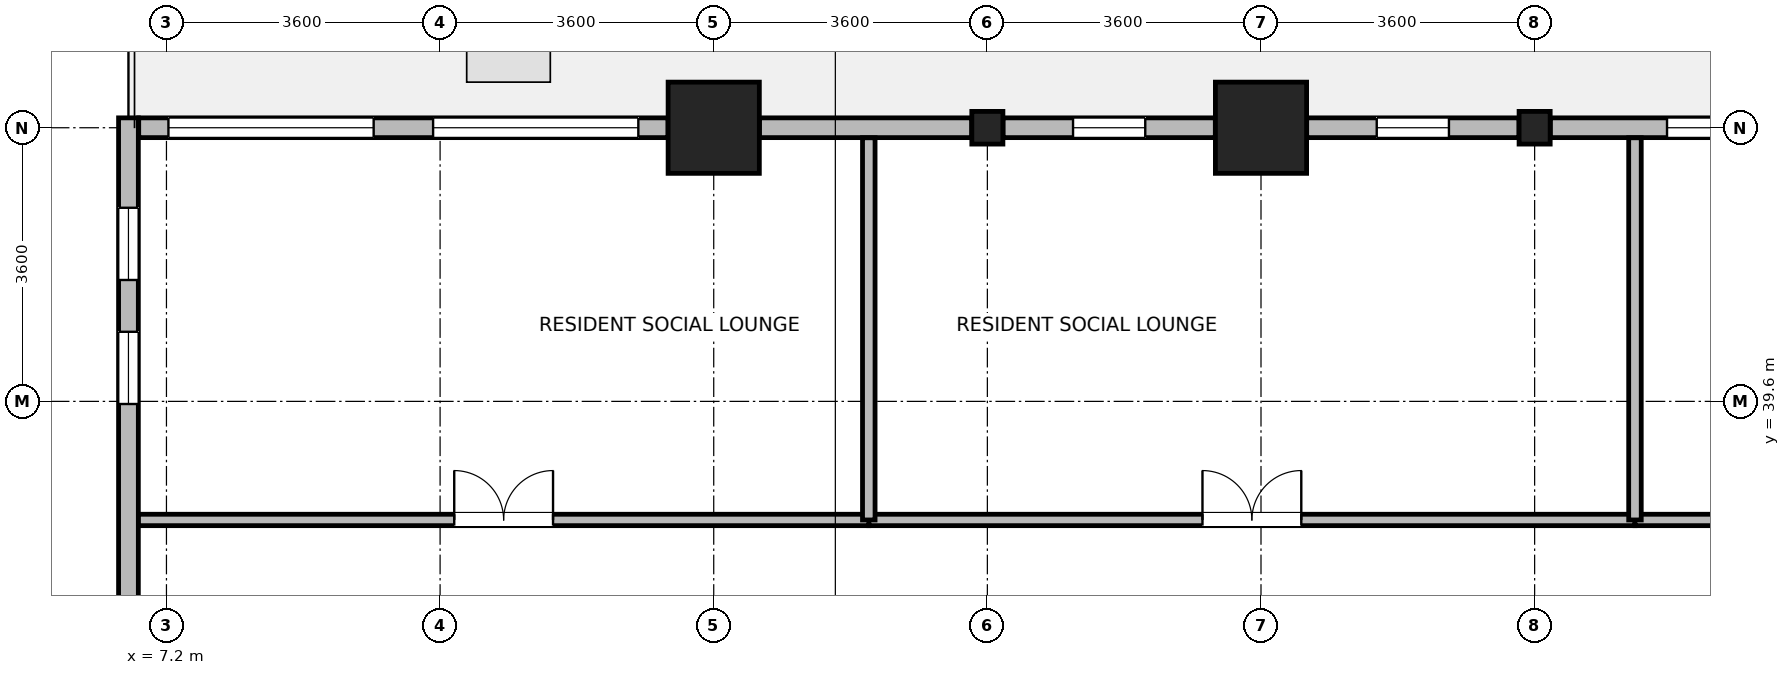
"""IFC4 building model, lengths in metres.
Left out: names, types, materials, properties, quantities, classifications, styles, units other than length and angle.
Written with IfcOpenShell. Run it as: python <this file> out.ifc"""

import sys

from ifc_helpers import new_model, si_unit, direction, frame, frame_2d, origin, origin_2d, place, context, subcontext, project, spatial, rectangle, i_section, extrude, source, transform, mapped, element, fill, save


model = new_model("IFC4")
c1 = context("Model", 3, precision=1e-05, world=origin(), true_north=direction((0.0, 1.0)))
c2 = subcontext(c1, "Body", "Model", "MODEL_VIEW")
j1 = project(units=[si_unit("LENGTHUNIT", "METRE"), si_unit("PLANEANGLEUNIT", "RADIAN")], contexts=[c1])
p1 = place(None, origin())
s1 = spatial("IfcSite", under=j1, at=p1, CompositionType="ELEMENT")
p2 = place(p1, origin())
s2 = spatial("IfcBuilding", under=s1, at=p2, CompositionType="ELEMENT")
p3 = place(p2, frame((0.0, 0.0, 82.3)))
s3 = spatial("IfcBuildingStorey", under=s2, at=p3, CompositionType="ELEMENT", Elevation=82.3)
m1 = source(origin(), c2, "Body", "SweptSolid", [
    extrude(rectangle(XDim=1.2, YDim=1.2, at=origin_2d()), origin(), (0.0, 0.0, 1.0), 3.7),
])
for number, where, z_axis, x_axis in (
    (1, (14.4, 43.2, 0.0), (0.0, 0.0, 1.0), (1.0, 0.0, 0.0)),
    (2, (21.6, 43.2, 0.0), (0.0, 0.0, 1.0), (1.0, 0.0, 0.0)),
):
    element("IfcColumn", number, at=place(p3, frame(where, z_axis=z_axis, x_axis=x_axis)), inside=s3, PredefinedType="COLUMN", context=c2, shape_type="MappedRepresentation", body=[
        mapped(m1, transform((0.0, 0.0, 0.0), x_axis=(1.0, 0.0, 0.0), y_axis=(0.0, 1.0, 0.0), z_axis=(0.0, 0.0, 1.0), scale=1.0)),
    ])
m2 = source(origin(), c2, "Body", "SweptSolid", [
    extrude(i_section(OverallWidth=0.409, OverallDepth=0.43, WebThickness=0.024, FlangeThickness=0.033, FilletRadius=0.015, at=origin_2d()), origin(), (0.0, 0.0, 1.0), 3.7),
])
for number, where, z_axis, x_axis in (
    (3, (18.0, 43.2, 0.0), (0.0, 0.0, 1.0), (1.0, 0.0, 0.0)),
    (4, (25.2, 43.2, 0.0), (0.0, 0.0, 1.0), (1.0, 0.0, 0.0)),
):
    element("IfcColumn", number, at=place(p3, frame(where, z_axis=z_axis, x_axis=x_axis)), inside=s3, PredefinedType="COLUMN", context=c2, shape_type="MappedRepresentation", body=[
        mapped(m2, transform((0.0, 0.0, 0.0), x_axis=(1.0, 0.0, 0.0), y_axis=(0.0, 1.0, 0.0), z_axis=(0.0, 0.0, 1.0), scale=1.0)),
    ])
p4 = place(p3, frame((25.406, 43.2, 0.0), z_axis=(0.0, 0.0, 1.0), x_axis=(1.0, 0.0, 0.0)))
e5 = element("IfcWall", 5, at=p4, inside=s3, PredefinedType="STANDARD", context=c2, shape_type="SweptSolid", body=[
    extrude(rectangle(XDim=2.793, YDim=0.26, at=frame_2d((1.397, 0.0))), origin(), (0.0, 0.0, 1.0), 2.93),
])
p5 = place(p4, frame((1.536, 0.0, 0.85)))
e6 = element("IfcOpeningElement", 6, at=p5, cuts=e5, PredefinedType="OPENING", context=c2, shape_type="SweptSolid", body=[
    extrude(rectangle(XDim=0.95, YDim=1.75, at=frame_2d((0.475, 0.875))), frame((0.0, 0.14, 0.0), z_axis=(0.0, -1.0, 0.0), x_axis=(1.0, 0.0, 0.0)), (0.0, 0.0, 1.0), 0.28),
])
p6 = place(p3, frame((22.201, 43.2, 0.0), z_axis=(0.0, 0.0, 1.0), x_axis=(1.0, 0.0, 0.0)))
e7 = element("IfcWall", 7, at=p6, inside=s3, PredefinedType="STANDARD", context=c2, shape_type="SweptSolid", body=[
    extrude(rectangle(XDim=2.793, YDim=0.26, at=frame_2d((1.397, 0.0))), origin(), (0.0, 0.0, 1.0), 2.93),
])
p7 = place(p6, frame((0.922, 0.0, 0.85)))
e8 = element("IfcOpeningElement", 8, at=p7, cuts=e7, PredefinedType="OPENING", context=c2, shape_type="SweptSolid", body=[
    extrude(rectangle(XDim=0.95, YDim=1.75, at=frame_2d((0.475, 0.875))), frame((0.0, 0.14, 0.0), z_axis=(0.0, -1.0, 0.0), x_axis=(1.0, 0.0, 0.0)), (0.0, 0.0, 1.0), 0.28),
])
p8 = place(p3, frame((18.206, 43.2, 0.0), z_axis=(0.0, 0.0, 1.0), x_axis=(1.0, 0.0, 0.0)))
e9 = element("IfcWall", 9, at=p8, inside=s3, PredefinedType="STANDARD", context=c2, shape_type="SweptSolid", body=[
    extrude(rectangle(XDim=2.793, YDim=0.26, at=frame_2d((1.397, 0.0))), origin(), (0.0, 0.0, 1.0), 2.93),
])
p9 = place(p8, frame((0.922, 0.0, 0.85)))
e10 = element("IfcOpeningElement", 10, at=p9, cuts=e9, PredefinedType="OPENING", context=c2, shape_type="SweptSolid", body=[
    extrude(rectangle(XDim=0.95, YDim=1.75, at=frame_2d((0.475, 0.875))), frame((0.0, 0.14, 0.0), z_axis=(0.0, -1.0, 0.0), x_axis=(1.0, 0.0, 0.0)), (0.0, 0.0, 1.0), 0.28),
])
p10 = place(p3, frame((15.001, 43.2, 0.0), z_axis=(0.0, 0.0, 1.0), x_axis=(1.0, 0.0, 0.0)))
e11 = element("IfcWall", 11, at=p10, inside=s3, PredefinedType="STANDARD", context=c2, shape_type="SweptSolid", body=[
    extrude(rectangle(XDim=2.793, YDim=0.26, at=frame_2d((1.397, 0.0))), origin(), (0.0, 0.0, 1.0), 2.93),
])
p11 = place(p3, frame((6.835, 43.2, 0.0), z_axis=(0.0, 0.0, 1.0), x_axis=(1.0, 0.0, 0.0)))
e12 = element("IfcWall", 12, at=p11, inside=s3, PredefinedType="STANDARD", context=c2, shape_type="SweptSolid", body=[
    extrude(rectangle(XDim=6.964, YDim=0.26, at=frame_2d((3.482, 0.0))), origin(), (0.0, 0.0, 1.0), 3.43),
])
p12 = place(p11, frame((0.391, 0.0, 0.85)))
e13 = element("IfcOpeningElement", 13, at=p12, cuts=e12, PredefinedType="OPENING", context=c2, shape_type="SweptSolid", body=[
    extrude(rectangle(XDim=2.7, YDim=2.05, at=frame_2d((1.35, 1.025))), frame((0.0, 0.14, 0.0), z_axis=(0.0, -1.0, 0.0), x_axis=(1.0, 0.0, 0.0)), (0.0, 0.0, 1.0), 0.28),
])
p13 = place(p11, frame((3.873, 0.0, 0.85)))
e14 = element("IfcOpeningElement", 14, at=p13, cuts=e12, PredefinedType="OPENING", context=c2, shape_type="SweptSolid", body=[
    extrude(rectangle(XDim=2.7, YDim=2.05, at=frame_2d((1.35, 1.025))), frame((0.0, 0.14, 0.0), z_axis=(0.0, -1.0, 0.0), x_axis=(1.0, 0.0, 0.0)), (0.0, 0.0, 1.0), 0.28),
])
p14 = place(p3, frame((6.7, 36.751, 0.0), z_axis=(0.0, 0.0, 1.0), x_axis=(0.0, 1.0, 0.0)))
e15 = element("IfcWall", 15, at=p14, inside=s3, PredefinedType="STANDARD", context=c2, shape_type="SweptSolid", body=[
    extrude(rectangle(XDim=6.579, YDim=0.26, at=frame_2d((3.29, 0.0))), origin(), (0.0, 0.0, 1.0), 3.43),
])
p15 = place(p14, frame((2.814, 0.0, 0.85)))
e16 = element("IfcOpeningElement", 16, at=p15, cuts=e15, PredefinedType="OPENING", context=c2, shape_type="SweptSolid", body=[
    extrude(rectangle(XDim=0.95, YDim=1.75, at=frame_2d((0.475, 0.875))), frame((0.0, 0.14, 0.0), z_axis=(0.0, -1.0, 0.0), x_axis=(1.0, 0.0, 0.0)), (0.0, 0.0, 1.0), 0.28),
])
p16 = place(p14, frame((4.446, 0.0, 0.85)))
e17 = element("IfcOpeningElement", 17, at=p16, cuts=e15, PredefinedType="OPENING", context=c2, shape_type="SweptSolid", body=[
    extrude(rectangle(XDim=0.95, YDim=1.75, at=frame_2d((0.475, 0.875))), frame((0.0, 0.14, 0.0), z_axis=(0.0, -1.0, 0.0), x_axis=(1.0, 0.0, 0.0)), (0.0, 0.0, 1.0), 0.28),
])
p17 = place(p3, frame((16.44, 38.04, 0.0), z_axis=(0.0, 0.0, 1.0), x_axis=(1.0, 0.0, 0.0)))
e18 = element("IfcWall", 18, at=p17, inside=s3, PredefinedType="PARTITIONING", context=c2, shape_type="SweptSolid", body=[
    extrude(rectangle(XDim=10.08, YDim=0.15, at=frame_2d((5.04, 0.0))), origin(), (0.0, 0.0, 1.0), 3.43),
])
p18 = place(p17, frame((4.39, 0.0, 0.0)))
e19 = element("IfcOpeningElement", 19, at=p18, cuts=e18, PredefinedType="OPENING", context=c2, shape_type="SweptSolid", body=[
    extrude(rectangle(XDim=1.3, YDim=2.12, at=frame_2d((0.65, 1.06))), frame((0.0, 0.085, 0.0), z_axis=(0.0, -1.0, 0.0), x_axis=(1.0, 0.0, 0.0)), (0.0, 0.0, 1.0), 0.17),
])
p19 = place(p3, frame((6.832, 38.04, 0.0), z_axis=(0.0, 0.0, 1.0), x_axis=(1.0, 0.0, 0.0)))
e20 = element("IfcWall", 20, at=p19, inside=s3, PredefinedType="PARTITIONING", context=c2, shape_type="SweptSolid", body=[
    extrude(rectangle(XDim=9.608, YDim=0.15, at=frame_2d((4.804, 0.0))), origin(), (0.0, 0.0, 1.0), 3.43),
])
p20 = place(p19, frame((4.154, 0.0, 0.0)))
e21 = element("IfcOpeningElement", 21, at=p20, cuts=e20, PredefinedType="OPENING", context=c2, shape_type="SweptSolid", body=[
    extrude(rectangle(XDim=1.3, YDim=2.12, at=frame_2d((0.65, 1.06))), frame((0.0, 0.085, 0.0), z_axis=(0.0, -1.0, 0.0), x_axis=(1.0, 0.0, 0.0)), (0.0, 0.0, 1.0), 0.17),
])
p21 = place(p3, frame((26.52, 38.04, 0.0), z_axis=(0.0, 0.0, 1.0), x_axis=(1.0, 0.0, 0.0)))
e22 = element("IfcWall", 22, at=p21, inside=s3, PredefinedType="PARTITIONING", context=c2, shape_type="SweptSolid", body=[
    extrude(rectangle(XDim=9.2, YDim=0.15, at=frame_2d((4.6, 0.0))), origin(), (0.0, 0.0, 1.0), 3.43),
])
p22 = place(p21, frame((4.15, 0.0, 0.0)))
e23 = element("IfcOpeningElement", 23, at=p22, cuts=e22, PredefinedType="OPENING", context=c2, shape_type="SweptSolid", body=[
    extrude(rectangle(XDim=0.9, YDim=2.08, at=frame_2d((0.45, 1.04))), frame((0.0, 0.085, 0.0), z_axis=(0.0, -1.0, 0.0), x_axis=(1.0, 0.0, 0.0)), (0.0, 0.0, 1.0), 0.17),
])
for number, where, z_axis, x_axis in (
    (24, (16.44, 38.04, 0.0), (0.0, 0.0, 1.0), (0.0, 1.0, 0.0)),
    (25, (26.52, 38.04, 0.0), (0.0, 0.0, 1.0), (0.0, 1.0, 0.0)),
):
    element("IfcWall", number, at=place(p3, frame(where, z_axis=z_axis, x_axis=x_axis)), inside=s3, PredefinedType="PARTITIONING", context=c2, shape_type="SweptSolid", body=[
        extrude(rectangle(XDim=5.028, YDim=0.165, at=frame_2d((2.514, 0.0))), origin(), (0.0, 0.0, 1.0), 3.43),
    ])
p23 = place(p5, origin())
e26 = element("IfcWindow", 26, at=p23, inside=s3, PartitioningType="SINGLE_PANEL", PredefinedType="WINDOW", context=c2, shape_type="SweptSolid", body=[
    extrude(rectangle(XDim=0.95, YDim=1.75, at=frame_2d((0.475, 0.875))), frame((0.0, 0.03, 0.0), z_axis=(0.0, -1.0, 0.0), x_axis=(1.0, 0.0, 0.0)), (0.0, 0.0, 1.0), 0.06),
])
fill(e6, e26)
p24 = place(p7, origin())
e27 = element("IfcWindow", 27, at=p24, inside=s3, PartitioningType="SINGLE_PANEL", PredefinedType="WINDOW", context=c2, shape_type="SweptSolid", body=[
    extrude(rectangle(XDim=0.95, YDim=1.75, at=frame_2d((0.475, 0.875))), frame((0.0, 0.03, 0.0), z_axis=(0.0, -1.0, 0.0), x_axis=(1.0, 0.0, 0.0)), (0.0, 0.0, 1.0), 0.06),
])
fill(e8, e27)
p25 = place(p9, origin())
e28 = element("IfcWindow", 28, at=p25, inside=s3, PartitioningType="SINGLE_PANEL", PredefinedType="WINDOW", context=c2, shape_type="SweptSolid", body=[
    extrude(rectangle(XDim=0.95, YDim=1.75, at=frame_2d((0.475, 0.875))), frame((0.0, 0.03, 0.0), z_axis=(0.0, -1.0, 0.0), x_axis=(1.0, 0.0, 0.0)), (0.0, 0.0, 1.0), 0.06),
])
fill(e10, e28)
p26 = place(p12, origin())
e29 = element("IfcWindow", 29, at=p26, inside=s3, PartitioningType="SINGLE_PANEL", PredefinedType="WINDOW", context=c2, shape_type="SweptSolid", body=[
    extrude(rectangle(XDim=2.7, YDim=2.05, at=frame_2d((1.35, 1.025))), frame((0.0, 0.03, 0.0), z_axis=(0.0, -1.0, 0.0), x_axis=(1.0, 0.0, 0.0)), (0.0, 0.0, 1.0), 0.06),
])
fill(e13, e29)
p27 = place(p13, origin())
e30 = element("IfcWindow", 30, at=p27, inside=s3, PartitioningType="SINGLE_PANEL", PredefinedType="WINDOW", context=c2, shape_type="SweptSolid", body=[
    extrude(rectangle(XDim=2.7, YDim=2.05, at=frame_2d((1.35, 1.025))), frame((0.0, 0.03, 0.0), z_axis=(0.0, -1.0, 0.0), x_axis=(1.0, 0.0, 0.0)), (0.0, 0.0, 1.0), 0.06),
])
fill(e14, e30)
p28 = place(p15, origin())
e31 = element("IfcWindow", 31, at=p28, inside=s3, PartitioningType="SINGLE_PANEL", PredefinedType="WINDOW", context=c2, shape_type="SweptSolid", body=[
    extrude(rectangle(XDim=0.95, YDim=1.75, at=frame_2d((0.475, 0.875))), frame((0.0, 0.03, 0.0), z_axis=(0.0, -1.0, 0.0), x_axis=(1.0, 0.0, 0.0)), (0.0, 0.0, 1.0), 0.06),
])
fill(e16, e31)
p29 = place(p16, origin())
e32 = element("IfcWindow", 32, at=p29, inside=s3, PartitioningType="SINGLE_PANEL", PredefinedType="WINDOW", context=c2, shape_type="SweptSolid", body=[
    extrude(rectangle(XDim=0.95, YDim=1.75, at=frame_2d((0.475, 0.875))), frame((0.0, 0.03, 0.0), z_axis=(0.0, -1.0, 0.0), x_axis=(1.0, 0.0, 0.0)), (0.0, 0.0, 1.0), 0.06),
])
fill(e17, e32)
p30 = place(p18, origin())
e33 = element("IfcDoor", 33, at=p30, inside=s3, OperationType="DOUBLE_DOOR_SINGLE_SWING", PredefinedType="DOOR", context=c2, shape_type="SweptSolid", body=[
    extrude(rectangle(XDim=1.3, YDim=2.12, at=frame_2d((0.65, 1.06))), frame((0.0, 0.025, 0.0), z_axis=(0.0, -1.0, 0.0), x_axis=(1.0, 0.0, 0.0)), (0.0, 0.0, 1.0), 0.05),
])
fill(e19, e33)
p31 = place(p20, origin())
e34 = element("IfcDoor", 34, at=p31, inside=s3, OperationType="DOUBLE_DOOR_SINGLE_SWING", PredefinedType="DOOR", context=c2, shape_type="SweptSolid", body=[
    extrude(rectangle(XDim=1.3, YDim=2.12, at=frame_2d((0.65, 1.06))), frame((0.0, 0.025, 0.0), z_axis=(0.0, -1.0, 0.0), x_axis=(1.0, 0.0, 0.0)), (0.0, 0.0, 1.0), 0.05),
])
fill(e21, e34)
save(model, sys.argv[1])
